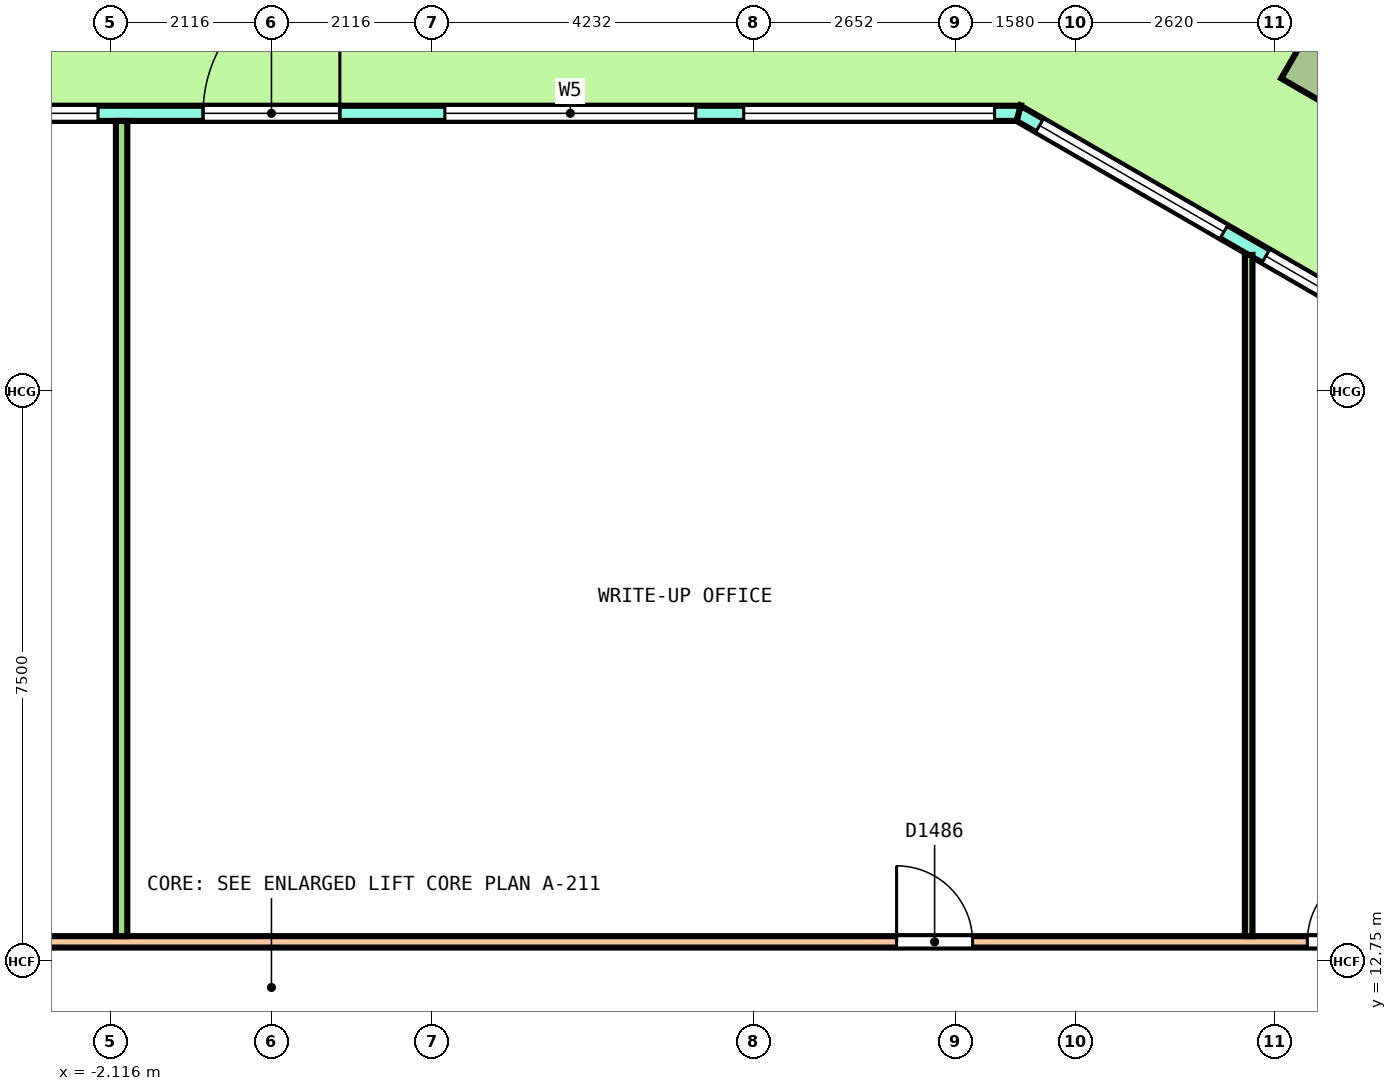
"""IFC4 building model, lengths in metres.
Left out: names, types, materials, properties, quantities, classifications, styles, units other than length and angle.
Written with IfcOpenShell. Run it as: python <this file> out.ifc"""

import sys

from ifc_helpers import new_model, si_unit, direction, frame, frame_2d, origin, origin_2d, place, context, subcontext, project, spatial, polyline, rectangle, outline, extrude, element, fill, save


model = new_model("IFC4")
c1 = context("Model", 3, precision=1e-05, world=origin(), true_north=direction((0.0, 1.0)))
c2 = subcontext(c1, "Body", "Model", "MODEL_VIEW")
j1 = project(units=[si_unit("LENGTHUNIT", "METRE"), si_unit("PLANEANGLEUNIT", "RADIAN")], contexts=[c1])
p1 = place(None, origin())
s1 = spatial("IfcSite", under=j1, at=p1, CompositionType="ELEMENT")
p2 = place(p1, origin())
s2 = spatial("IfcBuilding", under=s1, at=p2, CompositionType="ELEMENT")
p3 = place(p2, frame((0.0, 0.0, 80.8)))
s3 = spatial("IfcBuildingStorey", under=s2, at=p3, CompositionType="ELEMENT", Elevation=80.8)
p4 = place(p3, frame((14.206, 24.606, 0.0), z_axis=(0.036325398096, 0.0, 0.999340014936), x_axis=(-0.865311654478, 0.500246354177, 0.031453549198)))
e1 = element("IfcColumn", 1, at=p4, inside=s3, PredefinedType="COLUMN", context=c2, shape_type="SweptSolid", body=[
    extrude(rectangle(XDim=1.35, YDim=1.35, at=origin_2d()), origin(), (0.0, 0.0, 1.0), 4.053),
])
p5 = place(p3, frame((15.783, 20.463, 0.0), z_axis=(0.0, 0.0, 1.0), x_axis=(-0.866029458321, 0.49999297727, 0.0)))
e2 = element("IfcWall", 2, at=p5, inside=s3, PredefinedType="SOLIDWALL", context=c2, shape_type="SweptSolid", body=[
    extrude(outline(polyline([(-0.027, -0.1), (1.128, -0.1), (2.282, -0.1), (3.437, -0.1), (4.592, -0.1), (5.747, -0.1), (6.901, -0.1), (6.848, 0.1), (5.711, 0.1), (4.574, 0.1), (3.437, 0.1), (2.301, 0.1), (1.164, 0.1), (0.027, 0.1), (-0.027, -0.1)])), origin(), (0.0, 0.0, 1.0), 4.1),
])
p6 = place(p5, frame((0.319, 0.0, 0.1)))
e3 = element("IfcOpeningElement", 3, at=p6, cuts=e2, PredefinedType="OPENING", context=c2, shape_type="SweptSolid", body=[
    extrude(rectangle(XDim=2.8, YDim=2.9, at=frame_2d((1.4, 1.45))), frame((0.0, 0.11, 0.0), z_axis=(0.0, -1.0, 0.0), x_axis=(1.0, 0.0, 0.0)), (0.0, 0.0, 1.0), 0.22),
])
p7 = place(p5, frame((3.756, 0.0, 0.1)))
e4 = element("IfcOpeningElement", 4, at=p7, cuts=e2, PredefinedType="OPENING", context=c2, shape_type="SweptSolid", body=[
    extrude(rectangle(XDim=2.8, YDim=2.9, at=frame_2d((1.4, 1.45))), frame((0.0, 0.11, 0.0), z_axis=(0.0, -1.0, 0.0), x_axis=(1.0, 0.0, 0.0)), (0.0, 0.0, 1.0), 0.22),
])
p8 = place(p3, frame((9.83, 23.9, 0.0), z_axis=(0.0, 0.0, 1.0), x_axis=(-1.0, 0.0, 0.0)))
e5 = element("IfcWall", 5, at=p8, inside=s3, PredefinedType="SOLIDWALL", context=c2, shape_type="SweptSolid", body=[
    extrude(outline(polyline([(-0.027, -0.1), (1.011, -0.1), (2.048, -0.1), (3.086, -0.1), (4.123, -0.1), (5.161, -0.1), (6.198, -0.1), (7.236, -0.1), (8.273, -0.1), (9.311, -0.1), (10.348, -0.1), (11.386, -0.1), (12.423, -0.1), (13.461, -0.1), (14.499, -0.1), (15.536, -0.1), (16.573, -0.1), (17.611, -0.1), (18.648, -0.1), (19.686, -0.1), (19.632, 0.1), (18.6, 0.1), (17.569, 0.1), (16.537, 0.1), (15.505, 0.1), (14.473, 0.1), (13.441, 0.1), (12.409, 0.1), (11.377, 0.1), (10.345, 0.1), (9.314, 0.1), (8.282, 0.1), (7.25, 0.1), (6.218, 0.1), (5.186, 0.1), (4.154, 0.1), (3.123, 0.1), (2.091, 0.1), (1.059, 0.1), (0.027, 0.1), (-0.027, -0.1)])), origin(), (0.0, 0.0, 1.0), 4.1),
])
p9 = place(p8, frame((0.316, 0.0, 0.1)))
e6 = element("IfcOpeningElement", 6, at=p9, cuts=e5, PredefinedType="OPENING", context=c2, shape_type="SweptSolid", body=[
    extrude(rectangle(XDim=3.3, YDim=2.9, at=frame_2d((1.65, 1.45))), frame((0.0, 0.11, 0.0), z_axis=(0.0, -1.0, 0.0), x_axis=(1.0, 0.0, 0.0)), (0.0, 0.0, 1.0), 0.22),
])
p10 = place(p8, frame((4.248, 0.0, 0.1)))
e7 = element("IfcOpeningElement", 7, at=p10, cuts=e5, PredefinedType="OPENING", context=c2, shape_type="SweptSolid", body=[
    extrude(rectangle(XDim=3.3, YDim=2.9, at=frame_2d((1.65, 1.45))), frame((0.0, 0.11, 0.0), z_axis=(0.0, -1.0, 0.0), x_axis=(1.0, 0.0, 0.0)), (0.0, 0.0, 1.0), 0.22),
])
p11 = place(p8, frame((8.93, 0.0, 0.0)))
e8 = element("IfcOpeningElement", 8, at=p11, cuts=e5, PredefinedType="OPENING", context=c2, shape_type="SweptSolid", body=[
    extrude(rectangle(XDim=1.8, YDim=2.4, at=frame_2d((0.9, 1.2))), frame((0.0, 0.11, 0.0), z_axis=(0.0, -1.0, 0.0), x_axis=(1.0, 0.0, 0.0)), (0.0, 0.0, 1.0), 0.22),
])
p12 = place(p8, frame((8.93, 0.0, 2.55)))
e9 = element("IfcOpeningElement", 9, at=p12, cuts=e5, PredefinedType="OPENING", context=c2, shape_type="SweptSolid", body=[
    extrude(rectangle(XDim=1.8, YDim=0.45, at=frame_2d((0.9, 0.225))), frame((0.0, 0.11, 0.0), z_axis=(0.0, -1.0, 0.0), x_axis=(1.0, 0.0, 0.0)), (0.0, 0.0, 1.0), 0.22),
])
p13 = place(p8, frame((12.112, 0.0, 0.1)))
e10 = element("IfcOpeningElement", 10, at=p13, cuts=e5, PredefinedType="OPENING", context=c2, shape_type="SweptSolid", body=[
    extrude(rectangle(XDim=3.3, YDim=2.9, at=frame_2d((1.65, 1.45))), frame((0.0, 0.11, 0.0), z_axis=(0.0, -1.0, 0.0), x_axis=(1.0, 0.0, 0.0)), (0.0, 0.0, 1.0), 0.22),
])
p14 = place(p8, frame((16.043, 0.0, 0.1)))
e11 = element("IfcOpeningElement", 11, at=p14, cuts=e5, PredefinedType="OPENING", context=c2, shape_type="SweptSolid", body=[
    extrude(rectangle(XDim=3.3, YDim=2.9, at=frame_2d((1.65, 1.45))), frame((0.0, 0.11, 0.0), z_axis=(0.0, -1.0, 0.0), x_axis=(1.0, 0.0, 0.0)), (0.0, 0.0, 1.0), 0.22),
])
p15 = place(p3, frame((-15.325, 13.0, 0.0), z_axis=(0.0, 0.0, 1.0), x_axis=(1.0, 0.0, 0.0)))
e12 = element("IfcWall", 12, at=p15, inside=s3, PredefinedType="PARTITIONING", context=c2, shape_type="SweptSolid", body=[
    extrude(rectangle(XDim=30.675, YDim=0.15, at=frame_2d((15.337, 0.0))), origin(), (0.0, 0.0, 1.0), 3.05),
])
p16 = place(p15, frame((28.953, 0.0, 0.0)))
e13 = element("IfcOpeningElement", 13, at=p16, cuts=e12, PredefinedType="OPENING", context=c2, shape_type="SweptSolid", body=[
    extrude(rectangle(XDim=1.0, YDim=2.1, at=frame_2d((0.5, 1.05))), frame((0.0, 0.085, 0.0), z_axis=(0.0, -1.0, 0.0), x_axis=(1.0, 0.0, 0.0)), (0.0, 0.0, 1.0), 0.17),
])
p17 = place(p15, frame((23.55, 0.0, 0.0)))
e14 = element("IfcOpeningElement", 14, at=p17, cuts=e12, PredefinedType="OPENING", context=c2, shape_type="SweptSolid", body=[
    extrude(rectangle(XDim=1.0, YDim=2.1, at=frame_2d((0.5, 1.05))), frame((0.0, 0.085, 0.0), z_axis=(0.0, -1.0, 0.0), x_axis=(1.0, 0.0, 0.0)), (0.0, 0.0, 1.0), 0.17),
])
p18 = place(p15, frame((7.769, 0.0, 0.0)))
e15 = element("IfcOpeningElement", 15, at=p18, cuts=e12, PredefinedType="OPENING", context=c2, shape_type="SweptSolid", body=[
    extrude(rectangle(XDim=1.2, YDim=2.1, at=frame_2d((0.6, 1.05))), frame((0.0, 0.085, 0.0), z_axis=(0.0, -1.0, 0.0), x_axis=(1.0, 0.0, 0.0)), (0.0, 0.0, 1.0), 0.17),
])
p19 = place(p3, frame((-1.971, 13.075, 0.0), z_axis=(0.0, 0.0, 1.0), x_axis=(0.0, 1.0, 0.0)))
e16 = element("IfcWall", 16, at=p19, inside=s3, PredefinedType="PARTITIONING", context=c2, shape_type="SweptSolid", body=[
    extrude(rectangle(XDim=10.725, YDim=0.15, at=frame_2d((5.363, 0.0))), origin(), (0.0, 0.0, 1.0), 3.05),
])
p20 = place(p3, frame((12.856, 13.075, 0.0), z_axis=(0.0, 0.0, 1.0), x_axis=(0.0, 1.0, 0.0)))
e17 = element("IfcWall", 17, at=p20, inside=s3, PredefinedType="PARTITIONING", context=c2, shape_type="SweptSolid", body=[
    extrude(rectangle(XDim=8.962, YDim=0.1, at=frame_2d((4.481, 0.0))), origin(), (0.0, 0.0, 1.0), 3.05),
])
p21 = place(p6, origin())
e18 = element("IfcWindow", 18, at=p21, inside=s3, PartitioningType="SINGLE_PANEL", PredefinedType="WINDOW", context=c2, shape_type="SweptSolid", body=[
    extrude(rectangle(XDim=2.8, YDim=2.9, at=frame_2d((1.4, 1.45))), frame((0.0, 0.03, 0.0), z_axis=(0.0, -1.0, 0.0), x_axis=(1.0, 0.0, 0.0)), (0.0, 0.0, 1.0), 0.06),
])
fill(e3, e18)
p22 = place(p7, origin())
e19 = element("IfcWindow", 19, at=p22, inside=s3, PartitioningType="SINGLE_PANEL", PredefinedType="WINDOW", context=c2, shape_type="SweptSolid", body=[
    extrude(rectangle(XDim=2.8, YDim=2.9, at=frame_2d((1.4, 1.45))), frame((0.0, 0.03, 0.0), z_axis=(0.0, -1.0, 0.0), x_axis=(1.0, 0.0, 0.0)), (0.0, 0.0, 1.0), 0.06),
])
fill(e4, e19)
p23 = place(p9, origin())
e20 = element("IfcWindow", 20, at=p23, inside=s3, PartitioningType="SINGLE_PANEL", PredefinedType="WINDOW", context=c2, shape_type="SweptSolid", body=[
    extrude(rectangle(XDim=3.3, YDim=2.9, at=frame_2d((1.65, 1.45))), frame((0.0, 0.03, 0.0), z_axis=(0.0, -1.0, 0.0), x_axis=(1.0, 0.0, 0.0)), (0.0, 0.0, 1.0), 0.06),
])
fill(e6, e20)
p24 = place(p10, origin())
e21 = element("IfcWindow", 21, at=p24, inside=s3, PartitioningType="SINGLE_PANEL", PredefinedType="WINDOW", context=c2, shape_type="SweptSolid", body=[
    extrude(rectangle(XDim=3.3, YDim=2.9, at=frame_2d((1.65, 1.45))), frame((0.0, 0.03, 0.0), z_axis=(0.0, -1.0, 0.0), x_axis=(1.0, 0.0, 0.0)), (0.0, 0.0, 1.0), 0.06),
])
fill(e7, e21)
p25 = place(p11, origin())
e22 = element("IfcDoor", 22, at=p25, inside=s3, OperationType="DOUBLE_DOOR_SINGLE_SWING", PredefinedType="DOOR", context=c2, shape_type="SweptSolid", body=[
    extrude(rectangle(XDim=1.8, YDim=2.4, at=frame_2d((0.9, 1.2))), frame((0.0, 0.025, 0.0), z_axis=(0.0, -1.0, 0.0), x_axis=(1.0, 0.0, 0.0)), (0.0, 0.0, 1.0), 0.05),
])
fill(e8, e22)
p26 = place(p12, origin())
e23 = element("IfcWindow", 23, at=p26, inside=s3, PartitioningType="SINGLE_PANEL", PredefinedType="WINDOW", context=c2, shape_type="SweptSolid", body=[
    extrude(rectangle(XDim=1.8, YDim=0.45, at=frame_2d((0.9, 0.225))), frame((0.0, 0.03, 0.0), z_axis=(0.0, -1.0, 0.0), x_axis=(1.0, 0.0, 0.0)), (0.0, 0.0, 1.0), 0.06),
])
fill(e9, e23)
p27 = place(p13, origin())
e24 = element("IfcWindow", 24, at=p27, inside=s3, PartitioningType="SINGLE_PANEL", PredefinedType="WINDOW", context=c2, shape_type="SweptSolid", body=[
    extrude(rectangle(XDim=3.3, YDim=2.9, at=frame_2d((1.65, 1.45))), frame((0.0, 0.03, 0.0), z_axis=(0.0, -1.0, 0.0), x_axis=(1.0, 0.0, 0.0)), (0.0, 0.0, 1.0), 0.06),
])
fill(e10, e24)
p28 = place(p16, origin())
e25 = element("IfcDoor", 25, at=p28, inside=s3, OperationType="SINGLE_SWING_LEFT", PredefinedType="DOOR", context=c2, shape_type="SweptSolid", body=[
    extrude(rectangle(XDim=1.0, YDim=2.1, at=frame_2d((0.5, 1.05))), frame((0.0, 0.025, 0.0), z_axis=(0.0, -1.0, 0.0), x_axis=(1.0, 0.0, 0.0)), (0.0, 0.0, 1.0), 0.05),
])
fill(e13, e25)
p29 = place(p17, origin())
e26 = element("IfcDoor", 26, at=p29, inside=s3, OperationType="SINGLE_SWING_RIGHT", PredefinedType="DOOR", context=c2, shape_type="SweptSolid", body=[
    extrude(rectangle(XDim=1.0, YDim=2.1, at=frame_2d((0.5, 1.05))), frame((0.0, 0.025, 0.0), z_axis=(0.0, -1.0, 0.0), x_axis=(1.0, 0.0, 0.0)), (0.0, 0.0, 1.0), 0.05),
])
fill(e14, e26)
save(model, sys.argv[1])
